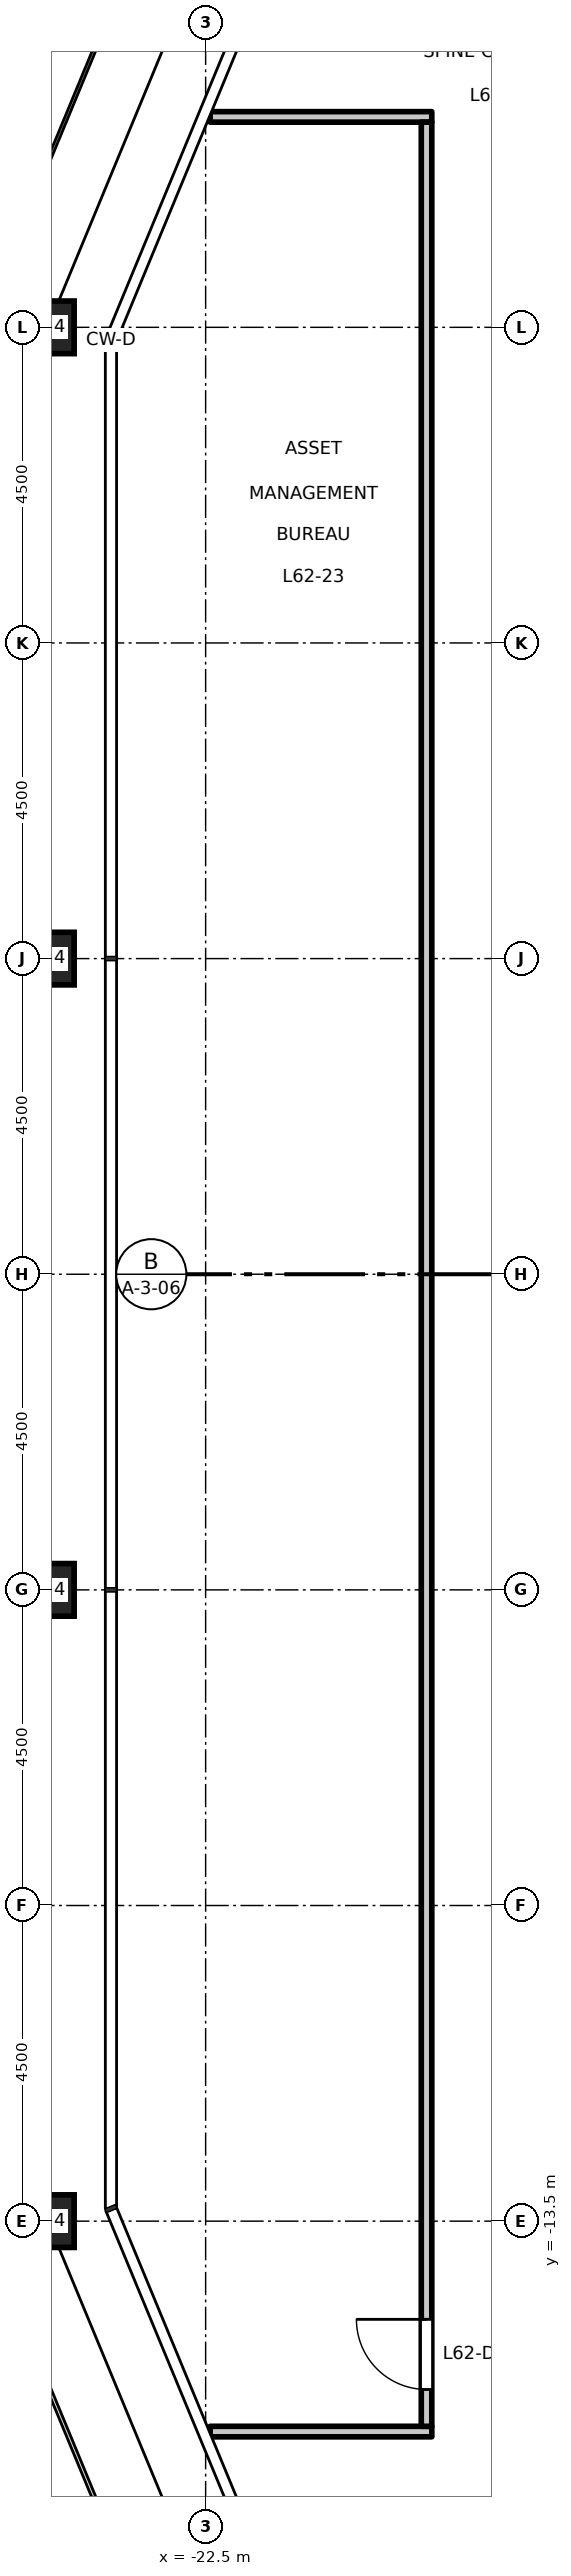
"""IFC4 building model, lengths in metres.
Left out: names, types, materials, properties, quantities, classifications, styles, units other than length and angle.
Written with IfcOpenShell. Run it as: python <this file> out.ifc"""

import sys

from ifc_helpers import new_model, si_unit, direction, frame, frame_2d, origin, origin_2d, place, context, subcontext, project, spatial, rectangle, hollow_rectangle, extrude, element, fill, save


model = new_model("IFC4")
c1 = context("Model", 3, precision=1e-05, world=origin(), true_north=direction((0.0, 1.0)))
c2 = subcontext(c1, "Body", "Model", "MODEL_VIEW")
j1 = project(units=[si_unit("LENGTHUNIT", "METRE"), si_unit("PLANEANGLEUNIT", "RADIAN")], contexts=[c1])
p1 = place(None, origin())
s1 = spatial("IfcSite", under=j1, at=p1, CompositionType="ELEMENT")
p2 = place(p1, origin())
s2 = spatial("IfcBuilding", under=s1, at=p2, CompositionType="ELEMENT")
p3 = place(p2, frame((0.0, 0.0, 289.7)))
s3 = spatial("IfcBuildingStorey", under=s2, at=p3, CompositionType="ELEMENT", Elevation=289.7)
for number, where, z_axis, x_axis in (
    (1, (-24.75, 13.5, 0.0), (0.0, 0.0, 1.0), (1.0, 0.0, 0.0)),
    (2, (-24.75, 4.5, 0.0), (0.0, 0.0, 1.0), (1.0, 0.0, 0.0)),
    (3, (-24.75, -4.5, 0.0), (0.0, 0.0, 1.0), (1.0, 0.0, 0.0)),
    (4, (-24.75, -13.5, 0.0), (0.0, 0.0, 1.0), (1.0, 0.0, 0.0)),
):
    element("IfcColumn", number, at=place(p3, frame(where, z_axis=z_axis, x_axis=x_axis)), inside=s3, PredefinedType="COLUMN", context=c2, shape_type="SweptSolid", body=[
        extrude(hollow_rectangle(XDim=0.75, YDim=0.75, WallThickness=0.04, at=origin_2d()), origin(), (0.0, 0.0, 1.0), 4.5),
    ])
for number, where, z_axis, x_axis in (
    (5, (-22.436, -16.5, 0.0), (0.0, 0.0, 1.0), (1.0, 0.0, 0.0)),
    (6, (-22.436, 16.5, 0.0), (0.0, 0.0, 1.0), (1.0, 0.0, 0.0)),
):
    element("IfcWall", number, at=place(p3, frame(where, z_axis=z_axis, x_axis=x_axis)), inside=s3, PredefinedType="PARTITIONING", context=c2, shape_type="SweptSolid", body=[
        extrude(rectangle(XDim=3.161, YDim=0.15, at=frame_2d((1.581, 0.0))), origin(), (0.0, 0.0, 1.0), 4.35),
    ])
p4 = place(p3, frame((-19.35, -16.425, 0.0), z_axis=(0.0, 0.0, 1.0), x_axis=(0.0, 1.0, 0.0)))
e7 = element("IfcWall", 7, at=p4, inside=s3, PredefinedType="PARTITIONING", context=c2, shape_type="SweptSolid", body=[
    extrude(rectangle(XDim=32.85, YDim=0.15, at=frame_2d((16.425, 0.0))), origin(), (0.0, 0.0, 1.0), 4.35),
])
p5 = place(p4, frame((0.525, 0.0, 0.0)))
e8 = element("IfcOpeningElement", 8, at=p5, cuts=e7, PredefinedType="OPENING", context=c2, shape_type="SweptSolid", body=[
    extrude(rectangle(XDim=1.0, YDim=2.1, at=frame_2d((0.5, 1.05))), frame((0.0, 0.085, 0.0), z_axis=(0.0, -1.0, 0.0), x_axis=(1.0, 0.0, 0.0)), (0.0, 0.0, 1.0), 0.17),
])
p6 = place(p5, origin())
e9 = element("IfcDoor", 9, at=p6, inside=s3, OperationType="SINGLE_SWING_RIGHT", PredefinedType="DOOR", context=c2, shape_type="SweptSolid", body=[
    extrude(rectangle(XDim=1.0, YDim=2.1, at=frame_2d((0.5, 1.05))), frame((0.0, 0.025, 0.0), z_axis=(0.0, -1.0, 0.0), x_axis=(1.0, 0.0, 0.0)), (0.0, 0.0, 1.0), 0.05),
])
fill(e8, e9)
save(model, sys.argv[1])
